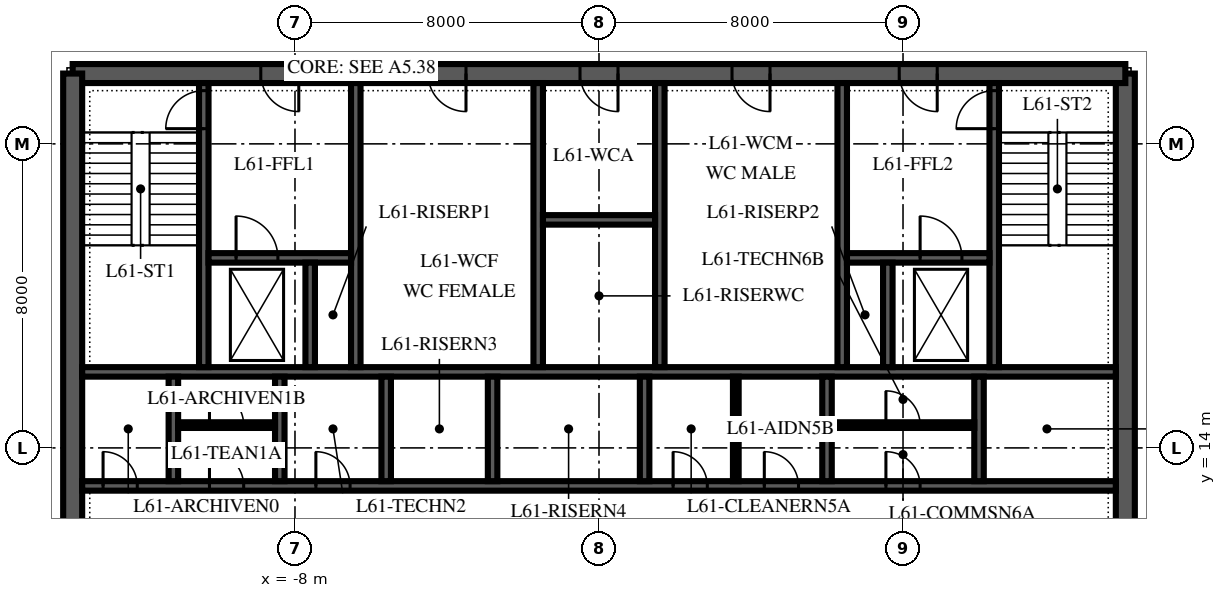
"""IFC4 building model, lengths in metres.
Left out: names, types, materials, properties, quantities, classifications, styles, units other than length and angle.
Written with IfcOpenShell. Run it as: python <this file> out.ifc"""

import sys

from ifc_helpers import new_model, si_unit, direction, frame, frame_2d, origin, place, context, subcontext, project, spatial, polyline, rectangle, outline, extrude, element, fill, save


model = new_model("IFC4")
c1 = context("Model", 3, precision=1e-05, world=origin(), true_north=direction((0.0, 1.0)))
c2 = subcontext(c1, "Body", "Model", "MODEL_VIEW")
j1 = project(units=[si_unit("LENGTHUNIT", "METRE"), si_unit("PLANEANGLEUNIT", "RADIAN")], contexts=[c1])
p1 = place(None, origin())
s1 = spatial("IfcSite", under=j1, at=p1, CompositionType="ELEMENT")
p2 = place(p1, origin())
s2 = spatial("IfcBuilding", under=s1, at=p2, CompositionType="ELEMENT")
p3 = place(p2, frame((0.0, 0.0, 264.0)))
s3 = spatial("IfcBuildingStorey", under=s2, at=p3, CompositionType="ELEMENT", Elevation=264.0)
p4 = place(p3, frame((13.85, 6.15, 0.0), z_axis=(0.0, 0.0, 1.0), x_axis=(0.0, 1.0, 0.0)))
e1 = element("IfcWall", 1, at=p4, inside=s3, PredefinedType="SHEAR", context=c2, shape_type="SweptSolid", body=[
    extrude(outline(polyline([(0.0, -0.25), (17.7, -0.25), (17.7, 0.0), (17.45, 0.0), (17.45, 0.25), (0.25, 0.25), (0.25, 0.0), (0.0, 0.0), (0.0, -0.25)])), origin(), (0.0, 0.0, 1.0), 4.0),
])
p5 = place(p4, frame((4.15, 0.0, 0.0)))
e2 = element("IfcOpeningElement", 2, at=p5, cuts=e1, PredefinedType="OPENING", context=c2, shape_type="SweptSolid", body=[
    extrude(rectangle(XDim=1.8, YDim=2.4, at=frame_2d((0.9, 1.2))), frame((0.0, 0.265, 0.0), z_axis=(0.0, -1.0, 0.0), x_axis=(1.0, 0.0, 0.0)), (0.0, 0.0, 1.0), 0.53),
])
p6 = place(p3, frame((13.85, 23.85, 0.0), z_axis=(0.0, 0.0, 1.0), x_axis=(-1.0, 0.0, 0.0)))
e3 = element("IfcWall", 3, at=p6, inside=s3, PredefinedType="SHEAR", context=c2, shape_type="SweptSolid", body=[
    extrude(rectangle(XDim=27.7, YDim=0.5, at=frame_2d((13.85, 0.0))), origin(), (0.0, 0.0, 1.0), 4.0),
])
p7 = place(p6, frame((21.75, 0.0, 0.0)))
e4 = element("IfcOpeningElement", 4, at=p7, cuts=e3, PredefinedType="OPENING", context=c2, shape_type="SweptSolid", body=[
    extrude(rectangle(XDim=1.0, YDim=2.1, at=frame_2d((0.5, 1.05))), frame((0.0, 0.265, 0.0), z_axis=(0.0, -1.0, 0.0), x_axis=(1.0, 0.0, 0.0)), (0.0, 0.0, 1.0), 0.53),
])
p8 = place(p6, frame((4.95, 0.0, 0.0)))
e5 = element("IfcOpeningElement", 5, at=p8, cuts=e3, PredefinedType="OPENING", context=c2, shape_type="SweptSolid", body=[
    extrude(rectangle(XDim=1.0, YDim=2.1, at=frame_2d((0.5, 1.05))), frame((0.0, 0.265, 0.0), z_axis=(0.0, -1.0, 0.0), x_axis=(1.0, 0.0, 0.0)), (0.0, 0.0, 1.0), 0.53),
])
p9 = place(p6, frame((17.35, 0.0, 0.0)))
e6 = element("IfcOpeningElement", 6, at=p9, cuts=e3, PredefinedType="OPENING", context=c2, shape_type="SweptSolid", body=[
    extrude(rectangle(XDim=1.0, YDim=2.1, at=frame_2d((0.5, 1.05))), frame((0.0, 0.265, 0.0), z_axis=(0.0, -1.0, 0.0), x_axis=(1.0, 0.0, 0.0)), (0.0, 0.0, 1.0), 0.53),
])
p10 = place(p6, frame((13.35, 0.0, 0.0)))
e7 = element("IfcOpeningElement", 7, at=p10, cuts=e3, PredefinedType="OPENING", context=c2, shape_type="SweptSolid", body=[
    extrude(rectangle(XDim=1.0, YDim=2.1, at=frame_2d((0.5, 1.05))), frame((0.0, 0.265, 0.0), z_axis=(0.0, -1.0, 0.0), x_axis=(1.0, 0.0, 0.0)), (0.0, 0.0, 1.0), 0.53),
])
p11 = place(p6, frame((9.35, 0.0, 0.0)))
e8 = element("IfcOpeningElement", 8, at=p11, cuts=e3, PredefinedType="OPENING", context=c2, shape_type="SweptSolid", body=[
    extrude(rectangle(XDim=1.0, YDim=2.1, at=frame_2d((0.5, 1.05))), frame((0.0, 0.265, 0.0), z_axis=(0.0, -1.0, 0.0), x_axis=(1.0, 0.0, 0.0)), (0.0, 0.0, 1.0), 0.53),
])
p12 = place(p3, frame((-13.85, 23.85, 0.0), z_axis=(0.0, 0.0, 1.0), x_axis=(0.0, -1.0, 0.0)))
e9 = element("IfcWall", 9, at=p12, inside=s3, PredefinedType="SHEAR", context=c2, shape_type="SweptSolid", body=[
    extrude(outline(polyline([(0.0, -0.25), (17.7, -0.25), (17.7, 0.0), (17.45, 0.0), (17.45, 0.25), (0.25, 0.25), (0.25, 0.0), (0.0, 0.0), (0.0, -0.25)])), origin(), (0.0, 0.0, 1.0), 4.0),
])
p13 = place(p12, frame((11.75, 0.0, 0.0)))
e10 = element("IfcOpeningElement", 10, at=p13, cuts=e9, PredefinedType="OPENING", context=c2, shape_type="SweptSolid", body=[
    extrude(rectangle(XDim=1.8, YDim=2.4, at=frame_2d((0.9, 1.2))), frame((0.0, 0.265, 0.0), z_axis=(0.0, -1.0, 0.0), x_axis=(1.0, 0.0, 0.0)), (0.0, 0.0, 1.0), 0.53),
])
p14 = place(p3, frame((-13.6, 13.0, 0.0), z_axis=(0.0, 0.0, 1.0), x_axis=(1.0, 0.0, 0.0)))
e11 = element("IfcWall", 11, at=p14, inside=s3, PredefinedType="SHEAR", context=c2, shape_type="SweptSolid", body=[
    extrude(rectangle(XDim=27.2, YDim=0.25, at=frame_2d((13.6, 0.0))), origin(), (0.0, 0.0, 1.0), 4.0),
])
p15 = place(p14, frame((15.55, 0.0, 0.0)))
e12 = element("IfcOpeningElement", 12, at=p15, cuts=e11, PredefinedType="OPENING", context=c2, shape_type="SweptSolid", body=[
    extrude(rectangle(XDim=0.9, YDim=2.1, at=frame_2d((0.45, 1.05))), frame((0.0, 0.14, 0.0), z_axis=(0.0, -1.0, 0.0), x_axis=(1.0, 0.0, 0.0)), (0.0, 0.0, 1.0), 0.28),
])
p16 = place(p14, frame((17.95, 0.0, 0.0)))
e13 = element("IfcOpeningElement", 13, at=p16, cuts=e11, PredefinedType="OPENING", context=c2, shape_type="SweptSolid", body=[
    extrude(rectangle(XDim=0.9, YDim=2.1, at=frame_2d((0.45, 1.05))), frame((0.0, 0.14, 0.0), z_axis=(0.0, -1.0, 0.0), x_axis=(1.0, 0.0, 0.0)), (0.0, 0.0, 1.0), 0.28),
])
p17 = place(p14, frame((21.15, 0.0, 0.0)))
e14 = element("IfcOpeningElement", 14, at=p17, cuts=e11, PredefinedType="OPENING", context=c2, shape_type="SweptSolid", body=[
    extrude(rectangle(XDim=0.9, YDim=2.1, at=frame_2d((0.45, 1.05))), frame((0.0, 0.14, 0.0), z_axis=(0.0, -1.0, 0.0), x_axis=(1.0, 0.0, 0.0)), (0.0, 0.0, 1.0), 0.28),
])
p18 = place(p14, frame((0.55, 0.0, 0.0)))
e15 = element("IfcOpeningElement", 15, at=p18, cuts=e11, PredefinedType="OPENING", context=c2, shape_type="SweptSolid", body=[
    extrude(rectangle(XDim=0.9, YDim=2.1, at=frame_2d((0.45, 1.05))), frame((0.0, 0.14, 0.0), z_axis=(0.0, -1.0, 0.0), x_axis=(1.0, 0.0, 0.0)), (0.0, 0.0, 1.0), 0.28),
])
p19 = place(p14, frame((3.35, 0.0, 0.0)))
e16 = element("IfcOpeningElement", 16, at=p19, cuts=e11, PredefinedType="OPENING", context=c2, shape_type="SweptSolid", body=[
    extrude(rectangle(XDim=0.9, YDim=2.1, at=frame_2d((0.45, 1.05))), frame((0.0, 0.14, 0.0), z_axis=(0.0, -1.0, 0.0), x_axis=(1.0, 0.0, 0.0)), (0.0, 0.0, 1.0), 0.28),
])
p20 = place(p14, frame((6.15, 0.0, 0.0)))
e17 = element("IfcOpeningElement", 17, at=p20, cuts=e11, PredefinedType="OPENING", context=c2, shape_type="SweptSolid", body=[
    extrude(rectangle(XDim=0.9, YDim=2.1, at=frame_2d((0.45, 1.05))), frame((0.0, 0.14, 0.0), z_axis=(0.0, -1.0, 0.0), x_axis=(1.0, 0.0, 0.0)), (0.0, 0.0, 1.0), 0.28),
])
p21 = place(p3, frame((-13.6, 16.0, 0.0), z_axis=(0.0, 0.0, 1.0), x_axis=(1.0, 0.0, 0.0)))
e18 = element("IfcWall", 18, at=p21, inside=s3, PredefinedType="SHEAR", context=c2, shape_type="SweptSolid", body=[
    extrude(rectangle(XDim=27.2, YDim=0.25, at=frame_2d((13.6, 0.0))), origin(), (0.0, 0.0, 1.0), 4.0),
])
for number, where, z_axis, x_axis in (
    (19, (-11.2, 13.125, 0.0), (0.0, 0.0, 1.0), (0.0, 1.0, 0.0)),
    (20, (-8.4, 13.125, 0.0), (0.0, 0.0, 1.0), (0.0, 1.0, 0.0)),
    (21, (-5.6, 13.125, 0.0), (0.0, 0.0, 1.0), (0.0, 1.0, 0.0)),
    (22, (-2.8, 13.125, 0.0), (0.0, 0.0, 1.0), (0.0, 1.0, 0.0)),
    (23, (1.2, 13.125, 0.0), (0.0, 0.0, 1.0), (0.0, 1.0, 0.0)),
    (24, (6.0, 13.125, 0.0), (0.0, 0.0, 1.0), (0.0, 1.0, 0.0)),
    (25, (10.0, 13.125, 0.0), (0.0, 0.0, 1.0), (0.0, 1.0, 0.0)),
):
    element("IfcWall", number, at=place(p3, frame(where, z_axis=z_axis, x_axis=x_axis)), inside=s3, PredefinedType="SHEAR", context=c2, shape_type="SweptSolid", body=[
        extrude(rectangle(XDim=2.75, YDim=0.25, at=frame_2d((1.375, 0.0))), origin(), (0.0, 0.0, 1.0), 4.0),
    ])
p22 = place(p3, frame((-10.4, 16.125, 0.0), z_axis=(0.0, 0.0, 1.0), x_axis=(0.0, 1.0, 0.0)))
e26 = element("IfcWall", 26, at=p22, inside=s3, PredefinedType="SHEAR", context=c2, shape_type="SweptSolid", body=[
    extrude(rectangle(XDim=7.475, YDim=0.25, at=frame_2d((3.738, 0.0))), origin(), (0.0, 0.0, 1.0), 4.0),
])
p23 = place(p22, frame((6.275, 0.0, 0.0)))
e27 = element("IfcOpeningElement", 27, at=p23, cuts=e26, PredefinedType="OPENING", context=c2, shape_type="SweptSolid", body=[
    extrude(rectangle(XDim=1.0, YDim=2.1, at=frame_2d((0.5, 1.05))), frame((0.0, 0.14, 0.0), z_axis=(0.0, -1.0, 0.0), x_axis=(1.0, 0.0, 0.0)), (0.0, 0.0, 1.0), 0.28),
])
for number, where, z_axis, x_axis in (
    (28, (-6.4, 16.125, 0.0), (0.0, 0.0, 1.0), (0.0, 1.0, 0.0)),
    (29, (-1.6, 16.125, 0.0), (0.0, 0.0, 1.0), (0.0, 1.0, 0.0)),
    (30, (1.6, 16.125, 0.0), (0.0, 0.0, 1.0), (0.0, 1.0, 0.0)),
    (31, (6.4, 16.125, 0.0), (0.0, 0.0, 1.0), (0.0, 1.0, 0.0)),
):
    element("IfcWall", number, at=place(p3, frame(where, z_axis=z_axis, x_axis=x_axis)), inside=s3, PredefinedType="SHEAR", context=c2, shape_type="SweptSolid", body=[
        extrude(rectangle(XDim=7.475, YDim=0.25, at=frame_2d((3.738, 0.0))), origin(), (0.0, 0.0, 1.0), 4.0),
    ])
p24 = place(p3, frame((10.4, 16.125, 0.0), z_axis=(0.0, 0.0, 1.0), x_axis=(0.0, 1.0, 0.0)))
e32 = element("IfcWall", 32, at=p24, inside=s3, PredefinedType="SHEAR", context=c2, shape_type="SweptSolid", body=[
    extrude(rectangle(XDim=7.475, YDim=0.25, at=frame_2d((3.738, 0.0))), origin(), (0.0, 0.0, 1.0), 4.0),
])
p25 = place(p24, frame((6.275, 0.0, 0.0)))
e33 = element("IfcOpeningElement", 33, at=p25, cuts=e32, PredefinedType="OPENING", context=c2, shape_type="SweptSolid", body=[
    extrude(rectangle(XDim=1.0, YDim=2.1, at=frame_2d((0.5, 1.05))), frame((0.0, 0.14, 0.0), z_axis=(0.0, -1.0, 0.0), x_axis=(1.0, 0.0, 0.0)), (0.0, 0.0, 1.0), 0.28),
])
p26 = place(p3, frame((-10.275, 19.0, 0.0), z_axis=(0.0, 0.0, 1.0), x_axis=(1.0, 0.0, 0.0)))
e34 = element("IfcWall", 34, at=p26, inside=s3, PredefinedType="SHEAR", context=c2, shape_type="SweptSolid", body=[
    extrude(rectangle(XDim=3.75, YDim=0.25, at=frame_2d((1.875, 0.0))), origin(), (0.0, 0.0, 1.0), 4.0),
])
p27 = place(p26, frame((0.725, 0.0, 0.0)))
e35 = element("IfcOpeningElement", 35, at=p27, cuts=e34, PredefinedType="OPENING", context=c2, shape_type="SweptSolid", body=[
    extrude(rectangle(XDim=1.1, YDim=2.1, at=frame_2d((0.55, 1.05))), frame((0.0, 0.14, 0.0), z_axis=(0.0, -1.0, 0.0), x_axis=(1.0, 0.0, 0.0)), (0.0, 0.0, 1.0), 0.28),
])
p28 = place(p3, frame((6.525, 19.0, 0.0), z_axis=(0.0, 0.0, 1.0), x_axis=(1.0, 0.0, 0.0)))
e36 = element("IfcWall", 36, at=p28, inside=s3, PredefinedType="SHEAR", context=c2, shape_type="SweptSolid", body=[
    extrude(rectangle(XDim=3.75, YDim=0.25, at=frame_2d((1.875, 0.0))), origin(), (0.0, 0.0, 1.0), 4.0),
])
p29 = place(p28, frame((1.925, 0.0, 0.0)))
e37 = element("IfcOpeningElement", 37, at=p29, cuts=e36, PredefinedType="OPENING", context=c2, shape_type="SweptSolid", body=[
    extrude(rectangle(XDim=1.1, YDim=2.1, at=frame_2d((0.55, 1.05))), frame((0.0, 0.14, 0.0), z_axis=(0.0, -1.0, 0.0), x_axis=(1.0, 0.0, 0.0)), (0.0, 0.0, 1.0), 0.28),
])
for number, where, z_axis, x_axis in (
    (38, (-7.6, 16.125, 0.0), (0.0, 0.0, 1.0), (0.0, 1.0, 0.0)),
    (39, (7.6, 16.125, 0.0), (0.0, 0.0, 1.0), (0.0, 1.0, 0.0)),
):
    element("IfcWall", number, at=place(p3, frame(where, z_axis=z_axis, x_axis=x_axis)), inside=s3, PredefinedType="SHEAR", context=c2, shape_type="SweptSolid", body=[
        extrude(rectangle(XDim=2.75, YDim=0.25, at=frame_2d((1.375, 0.0))), origin(), (0.0, 0.0, 1.0), 4.0),
    ])
p30 = place(p3, frame((-1.475, 20.0, 0.0), z_axis=(0.0, 0.0, 1.0), x_axis=(1.0, 0.0, 0.0)))
e40 = element("IfcWall", 40, at=p30, inside=s3, PredefinedType="SHEAR", context=c2, shape_type="SweptSolid", body=[
    extrude(rectangle(XDim=2.95, YDim=0.25, at=frame_2d((1.475, 0.0))), origin(), (0.0, 0.0, 1.0), 4.0),
])
p31 = place(p3, frame((3.6, 13.125, 0.0), z_axis=(0.0, 0.0, 1.0), x_axis=(0.0, 1.0, 0.0)))
e41 = element("IfcWall", 41, at=p31, inside=s3, PredefinedType="PARTITIONING", context=c2, shape_type="SweptSolid", body=[
    extrude(rectangle(XDim=2.75, YDim=0.15, at=frame_2d((1.375, 0.0))), origin(), (0.0, 0.0, 1.0), 3.85),
])
p32 = place(p3, frame((6.125, 14.6, 0.0), z_axis=(0.0, 0.0, 1.0), x_axis=(1.0, 0.0, 0.0)))
e42 = element("IfcWall", 42, at=p32, inside=s3, PredefinedType="PARTITIONING", context=c2, shape_type="SweptSolid", body=[
    extrude(rectangle(XDim=3.75, YDim=0.15, at=frame_2d((1.875, 0.0))), origin(), (0.0, 0.0, 1.0), 3.85),
])
p33 = place(p32, frame((1.425, 0.0, 0.0)))
e43 = element("IfcOpeningElement", 43, at=p33, cuts=e42, PredefinedType="OPENING", context=c2, shape_type="SweptSolid", body=[
    extrude(rectangle(XDim=0.9, YDim=2.1, at=frame_2d((0.45, 1.05))), frame((0.0, 0.09, 0.0), z_axis=(0.0, -1.0, 0.0), x_axis=(1.0, 0.0, 0.0)), (0.0, 0.0, 1.0), 0.18),
])
p34 = place(p3, frame((-11.075, 14.6, 0.0), z_axis=(0.0, 0.0, 1.0), x_axis=(1.0, 0.0, 0.0)))
e44 = element("IfcWall", 44, at=p34, inside=s3, PredefinedType="PARTITIONING", context=c2, shape_type="SweptSolid", body=[
    extrude(rectangle(XDim=2.55, YDim=0.15, at=frame_2d((1.275, 0.0))), origin(), (0.0, 0.0, 1.0), 3.85),
])
p35 = place(p34, frame((0.825, 0.0, 0.0)))
e45 = element("IfcOpeningElement", 45, at=p35, cuts=e44, PredefinedType="OPENING", context=c2, shape_type="SweptSolid", body=[
    extrude(rectangle(XDim=0.9, YDim=2.1, at=frame_2d((0.45, 1.05))), frame((0.0, 0.09, 0.0), z_axis=(0.0, -1.0, 0.0), x_axis=(1.0, 0.0, 0.0)), (0.0, 0.0, 1.0), 0.18),
])
p36 = place(p7, origin())
e46 = element("IfcDoor", 46, at=p36, inside=s3, OperationType="SINGLE_SWING_RIGHT", PredefinedType="DOOR", context=c2, shape_type="SweptSolid", body=[
    extrude(rectangle(XDim=1.0, YDim=2.1, at=frame_2d((0.5, 1.05))), frame((0.0, 0.25, 0.0), z_axis=(0.0, -1.0, 0.0), x_axis=(1.0, 0.0, 0.0)), (0.0, 0.0, 1.0), 0.5),
])
fill(e4, e46)
p37 = place(p8, origin())
e47 = element("IfcDoor", 47, at=p37, inside=s3, OperationType="SINGLE_SWING_RIGHT", PredefinedType="DOOR", context=c2, shape_type="SweptSolid", body=[
    extrude(rectangle(XDim=1.0, YDim=2.1, at=frame_2d((0.5, 1.05))), frame((0.0, 0.25, 0.0), z_axis=(0.0, -1.0, 0.0), x_axis=(1.0, 0.0, 0.0)), (0.0, 0.0, 1.0), 0.5),
])
fill(e5, e47)
p38 = place(p9, origin())
e48 = element("IfcDoor", 48, at=p38, inside=s3, OperationType="SINGLE_SWING_LEFT", PredefinedType="DOOR", context=c2, shape_type="SweptSolid", body=[
    extrude(rectangle(XDim=1.0, YDim=2.1, at=frame_2d((0.5, 1.05))), frame((0.0, 0.25, 0.0), z_axis=(0.0, -1.0, 0.0), x_axis=(1.0, 0.0, 0.0)), (0.0, 0.0, 1.0), 0.5),
])
fill(e6, e48)
p39 = place(p10, origin())
e49 = element("IfcDoor", 49, at=p39, inside=s3, OperationType="SINGLE_SWING_LEFT", PredefinedType="DOOR", context=c2, shape_type="SweptSolid", body=[
    extrude(rectangle(XDim=1.0, YDim=2.1, at=frame_2d((0.5, 1.05))), frame((0.0, 0.25, 0.0), z_axis=(0.0, -1.0, 0.0), x_axis=(1.0, 0.0, 0.0)), (0.0, 0.0, 1.0), 0.5),
])
fill(e7, e49)
p40 = place(p11, origin())
e50 = element("IfcDoor", 50, at=p40, inside=s3, OperationType="SINGLE_SWING_LEFT", PredefinedType="DOOR", context=c2, shape_type="SweptSolid", body=[
    extrude(rectangle(XDim=1.0, YDim=2.1, at=frame_2d((0.5, 1.05))), frame((0.0, 0.25, 0.0), z_axis=(0.0, -1.0, 0.0), x_axis=(1.0, 0.0, 0.0)), (0.0, 0.0, 1.0), 0.5),
])
fill(e8, e50)
p41 = place(p23, origin())
e51 = element("IfcDoor", 51, at=p41, inside=s3, OperationType="SINGLE_SWING_LEFT", PredefinedType="DOOR", context=c2, shape_type="SweptSolid", body=[
    extrude(rectangle(XDim=1.0, YDim=2.1, at=frame_2d((0.5, 1.05))), frame((0.0, 0.125, 0.0), z_axis=(0.0, -1.0, 0.0), x_axis=(1.0, 0.0, 0.0)), (0.0, 0.0, 1.0), 0.25),
])
fill(e27, e51)
p42 = place(p25, origin())
e52 = element("IfcDoor", 52, at=p42, inside=s3, OperationType="SINGLE_SWING_LEFT", PredefinedType="DOOR", context=c2, shape_type="SweptSolid", body=[
    extrude(rectangle(XDim=1.0, YDim=2.1, at=frame_2d((0.5, 1.05))), frame((0.0, 0.125, 0.0), z_axis=(0.0, -1.0, 0.0), x_axis=(1.0, 0.0, 0.0)), (0.0, 0.0, 1.0), 0.25),
])
fill(e33, e52)
p43 = place(p29, origin())
e53 = element("IfcDoor", 53, at=p43, inside=s3, OperationType="SLIDING_TO_RIGHT", PredefinedType="DOOR", context=c2, shape_type="SweptSolid", body=[
    extrude(rectangle(XDim=1.1, YDim=2.1, at=frame_2d((0.55, 1.05))), frame((0.0, 0.125, 0.0), z_axis=(0.0, -1.0, 0.0), x_axis=(1.0, 0.0, 0.0)), (0.0, 0.0, 1.0), 0.25),
])
fill(e37, e53)
p44 = place(p27, origin())
e54 = element("IfcDoor", 54, at=p44, inside=s3, OperationType="SLIDING_TO_RIGHT", PredefinedType="DOOR", context=c2, shape_type="SweptSolid", body=[
    extrude(rectangle(XDim=1.1, YDim=2.1, at=frame_2d((0.55, 1.05))), frame((0.0, 0.125, 0.0), z_axis=(0.0, -1.0, 0.0), x_axis=(1.0, 0.0, 0.0)), (0.0, 0.0, 1.0), 0.25),
])
fill(e35, e54)
p45 = place(p15, origin())
e55 = element("IfcDoor", 55, at=p45, inside=s3, OperationType="SINGLE_SWING_LEFT", PredefinedType="DOOR", context=c2, shape_type="SweptSolid", body=[
    extrude(rectangle(XDim=0.9, YDim=2.1, at=frame_2d((0.45, 1.05))), frame((0.0, 0.125, 0.0), z_axis=(0.0, -1.0, 0.0), x_axis=(1.0, 0.0, 0.0)), (0.0, 0.0, 1.0), 0.25),
])
fill(e12, e55)
p46 = place(p16, origin())
e56 = element("IfcDoor", 56, at=p46, inside=s3, OperationType="SINGLE_SWING_LEFT", PredefinedType="DOOR", context=c2, shape_type="SweptSolid", body=[
    extrude(rectangle(XDim=0.9, YDim=2.1, at=frame_2d((0.45, 1.05))), frame((0.0, 0.125, 0.0), z_axis=(0.0, -1.0, 0.0), x_axis=(1.0, 0.0, 0.0)), (0.0, 0.0, 1.0), 0.25),
])
fill(e13, e56)
p47 = place(p17, origin())
e57 = element("IfcDoor", 57, at=p47, inside=s3, OperationType="SINGLE_SWING_LEFT", PredefinedType="DOOR", context=c2, shape_type="SweptSolid", body=[
    extrude(rectangle(XDim=0.9, YDim=2.1, at=frame_2d((0.45, 1.05))), frame((0.0, 0.125, 0.0), z_axis=(0.0, -1.0, 0.0), x_axis=(1.0, 0.0, 0.0)), (0.0, 0.0, 1.0), 0.25),
])
fill(e14, e57)
p48 = place(p33, origin())
e58 = element("IfcDoor", 58, at=p48, inside=s3, OperationType="SINGLE_SWING_LEFT", PredefinedType="DOOR", context=c2, shape_type="SweptSolid", body=[
    extrude(rectangle(XDim=0.9, YDim=2.1, at=frame_2d((0.45, 1.05))), frame((0.0, 0.075, 0.0), z_axis=(0.0, -1.0, 0.0), x_axis=(1.0, 0.0, 0.0)), (0.0, 0.0, 1.0), 0.149),
])
fill(e43, e58)
p49 = place(p18, origin())
e59 = element("IfcDoor", 59, at=p49, inside=s3, OperationType="SINGLE_SWING_LEFT", PredefinedType="DOOR", context=c2, shape_type="SweptSolid", body=[
    extrude(rectangle(XDim=0.9, YDim=2.1, at=frame_2d((0.45, 1.05))), frame((0.0, 0.125, 0.0), z_axis=(0.0, -1.0, 0.0), x_axis=(1.0, 0.0, 0.0)), (0.0, 0.0, 1.0), 0.25),
])
fill(e15, e59)
p50 = place(p19, origin())
e60 = element("IfcDoor", 60, at=p50, inside=s3, OperationType="SINGLE_SWING_LEFT", PredefinedType="DOOR", context=c2, shape_type="SweptSolid", body=[
    extrude(rectangle(XDim=0.9, YDim=2.1, at=frame_2d((0.45, 1.05))), frame((0.0, 0.125, 0.0), z_axis=(0.0, -1.0, 0.0), x_axis=(1.0, 0.0, 0.0)), (0.0, 0.0, 1.0), 0.25),
])
fill(e16, e60)
p51 = place(p35, origin())
e61 = element("IfcDoor", 61, at=p51, inside=s3, OperationType="SINGLE_SWING_LEFT", PredefinedType="DOOR", context=c2, shape_type="SweptSolid", body=[
    extrude(rectangle(XDim=0.9, YDim=2.1, at=frame_2d((0.45, 1.05))), frame((0.0, 0.075, 0.0), z_axis=(0.0, -1.0, 0.0), x_axis=(1.0, 0.0, 0.0)), (0.0, 0.0, 1.0), 0.149),
])
fill(e45, e61)
p52 = place(p20, origin())
e62 = element("IfcDoor", 62, at=p52, inside=s3, OperationType="SINGLE_SWING_LEFT", PredefinedType="DOOR", context=c2, shape_type="SweptSolid", body=[
    extrude(rectangle(XDim=0.9, YDim=2.1, at=frame_2d((0.45, 1.05))), frame((0.0, 0.125, 0.0), z_axis=(0.0, -1.0, 0.0), x_axis=(1.0, 0.0, 0.0)), (0.0, 0.0, 1.0), 0.25),
])
fill(e17, e62)
save(model, sys.argv[1])
